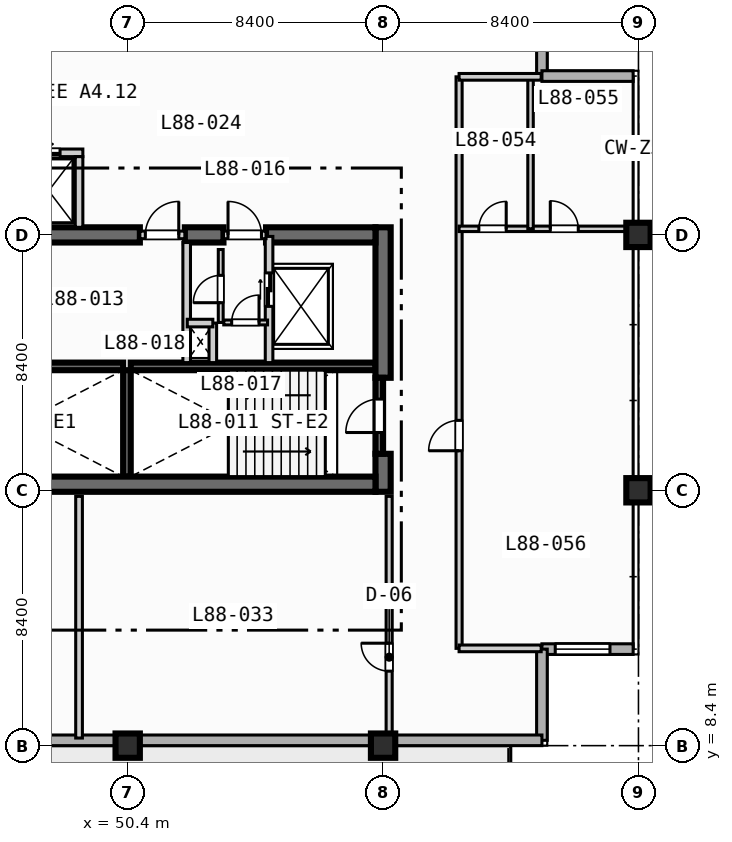
"""IFC4 building model, lengths in metres.
Left out: names, types, materials, properties, quantities, classifications, styles, units other than length and angle.
Written with IfcOpenShell. Run it as: python <this file> out.ifc"""

import sys

from ifc_helpers import new_model, si_unit, direction, frame, frame_2d, origin, origin_2d, place, context, subcontext, project, spatial, rectangle, extrude, element, fill, save


model = new_model("IFC4")
c1 = context("Model", 3, precision=1e-05, world=origin(), true_north=direction((0.0, 1.0)))
c2 = subcontext(c1, "Body", "Model", "MODEL_VIEW")
j1 = project(units=[si_unit("LENGTHUNIT", "METRE"), si_unit("PLANEANGLEUNIT", "RADIAN")], contexts=[c1])
p1 = place(None, origin())
s1 = spatial("IfcSite", under=j1, at=p1, CompositionType="ELEMENT")
p2 = place(p1, origin())
s2 = spatial("IfcBuilding", under=s1, at=p2, CompositionType="ELEMENT")
p3 = place(p2, frame((0.0, 0.0, 355.4)))
s3 = spatial("IfcBuildingStorey", under=s2, at=p3, CompositionType="ELEMENT", Elevation=355.4)
for number, where, z_axis, x_axis in (
    (1, (42.2, 20.875, 0.0), (0.0, 0.0, 1.0), (1.0, 0.0, 0.0)),
    (2, (50.5, 20.875, 0.0), (0.0, 0.0, 1.0), (1.0, 0.0, 0.0)),
):
    element("IfcWall", number, at=place(p3, frame(where, z_axis=z_axis, x_axis=x_axis)), inside=s3, PredefinedType="SOLIDWALL", context=c2, shape_type="SweptSolid", body=[
        extrude(rectangle(XDim=8.05, YDim=0.25, at=frame_2d((4.025, 0.0))), origin(), (0.0, 0.0, 1.0), 3.97),
    ])
p4 = place(p3, frame((50.375, 17.25, 0.0), z_axis=(0.0, 0.0, 1.0), x_axis=(0.0, 1.0, 0.0)))
e3 = element("IfcWall", 3, at=p4, inside=s3, PredefinedType="SOLIDWALL", context=c2, shape_type="SweptSolid", body=[
    extrude(rectangle(XDim=3.5, YDim=0.25, at=frame_2d((1.75, 0.0))), origin(), (0.0, 0.0, 1.0), 3.97),
])
p5 = place(p3, frame((58.8, 16.75, 0.0), z_axis=(0.0, 0.0, 1.0), x_axis=(0.0, 1.0, 0.0)))
e4 = element("IfcWall", 4, at=p5, inside=s3, PredefinedType="SHEAR", context=c2, shape_type="SweptSolid", body=[
    extrude(rectangle(XDim=1.25, YDim=0.5, at=frame_2d((0.625, 0.0))), origin(), (0.0, 0.0, 1.0), 3.97),
])
p6 = place(p3, frame((58.8, 20.5, 0.0), z_axis=(0.0, 0.0, 1.0), x_axis=(0.0, 1.0, 0.0)))
e5 = element("IfcWall", 5, at=p6, inside=s3, PredefinedType="SHEAR", context=c2, shape_type="SweptSolid", body=[
    extrude(rectangle(XDim=4.95, YDim=0.5, at=frame_2d((2.475, 0.0))), origin(), (0.0, 0.0, 1.0), 3.97),
])
p7 = place(p3, frame((42.2, 17.0, 0.0), z_axis=(0.0, 0.0, 1.0), x_axis=(1.0, 0.0, 0.0)))
e6 = element("IfcWall", 6, at=p7, inside=s3, PredefinedType="SHEAR", context=c2, shape_type="SweptSolid", body=[
    extrude(rectangle(XDim=16.35, YDim=0.5, at=frame_2d((8.175, 0.0))), origin(), (0.0, 0.0, 1.0), 3.97),
])
p8 = place(p3, frame((42.2, 25.2, 0.0), z_axis=(0.0, 0.0, 1.0), x_axis=(1.0, 0.0, 0.0)))
e7 = element("IfcWall", 7, at=p8, inside=s3, PredefinedType="SHEAR", context=c2, shape_type="SweptSolid", body=[
    extrude(rectangle(XDim=8.6, YDim=0.5, at=frame_2d((4.3, 0.0))), origin(), (0.0, 0.0, 1.0), 3.97),
])
p9 = place(p3, frame((52.28, 25.2, 0.0), z_axis=(0.0, 0.0, 1.0), x_axis=(1.0, 0.0, 0.0)))
e8 = element("IfcWall", 8, at=p9, inside=s3, PredefinedType="SHEAR", context=c2, shape_type="SweptSolid", body=[
    extrude(rectangle(XDim=1.27, YDim=0.5, at=frame_2d((0.635, 0.0))), origin(), (0.0, 0.0, 1.0), 3.97),
])
p10 = place(p3, frame((54.95, 25.2, 0.0), z_axis=(0.0, 0.0, 1.0), x_axis=(1.0, 0.0, 0.0)))
e9 = element("IfcWall", 9, at=p10, inside=s3, PredefinedType="SHEAR", context=c2, shape_type="SweptSolid", body=[
    extrude(rectangle(XDim=3.6, YDim=0.5, at=frame_2d((1.8, 0.0))), origin(), (0.0, 0.0, 1.0), 3.97),
])
for number, where, z_axis, x_axis in (
    (10, (50.4, 8.4, 0.0), (0.0, 0.0, 1.0), (1.0, 0.0, 0.0)),
    (11, (58.8, 8.4, 0.0), (0.0, 0.0, 1.0), (1.0, 0.0, 0.0)),
    (12, (67.2, 16.8, 0.0), (0.0, 0.0, 1.0), (1.0, 0.0, 0.0)),
    (13, (67.2, 25.2, 0.0), (0.0, 0.0, 1.0), (1.0, 0.0, 0.0)),
):
    element("IfcColumn", number, at=place(p3, frame(where, z_axis=z_axis, x_axis=x_axis)), inside=s3, PredefinedType="COLUMN", context=c2, shape_type="SweptSolid", body=[
        extrude(rectangle(XDim=0.8, YDim=0.8, at=origin_2d()), origin(), (0.0, 0.0, 1.0), 4.2),
    ])
for number, where, z_axis, x_axis in (
    (14, (64.025, 33.425, 0.0), (0.0, 0.0, 1.0), (0.0, -1.0, 0.0)),
    (15, (64.025, 30.425, 0.0), (0.0, 0.0, 1.0), (1.0, 0.0, 0.0)),
):
    element("IfcWall", number, at=place(p3, frame(where, z_axis=z_axis, x_axis=x_axis)), inside=s3, PredefinedType="STANDARD", context=c2, shape_type="SweptSolid", body=[
        extrude(rectangle(XDim=3.0, YDim=0.35, at=frame_2d((1.5, 0.0))), origin(), (0.0, 0.0, 1.0), 3.97),
    ])
p11 = place(p3, frame((67.025, 11.575, 0.0), z_axis=(0.0, 0.0, 1.0), x_axis=(-1.0, 0.0, 0.0)))
e16 = element("IfcWall", 16, at=p11, inside=s3, PredefinedType="STANDARD", context=c2, shape_type="SweptSolid", body=[
    extrude(rectangle(XDim=3.0, YDim=0.35, at=frame_2d((1.5, 0.0))), origin(), (0.0, 0.0, 1.0), 3.97),
])
p12 = place(p11, frame((0.762, 0.0, 0.85)))
e17 = element("IfcOpeningElement", 17, at=p12, cuts=e16, PredefinedType="OPENING", context=c2, shape_type="SweptSolid", body=[
    extrude(rectangle(XDim=1.8, YDim=1.8, at=frame_2d((0.9, 0.9))), frame((0.0, 0.185, 0.0), z_axis=(0.0, -1.0, 0.0), x_axis=(1.0, 0.0, 0.0)), (0.0, 0.0, 1.0), 0.37),
])
p13 = place(p3, frame((64.025, 11.575, 0.0), z_axis=(0.0, 0.0, 1.0), x_axis=(0.0, -1.0, 0.0)))
e18 = element("IfcWall", 18, at=p13, inside=s3, PredefinedType="STANDARD", context=c2, shape_type="SweptSolid", body=[
    extrude(rectangle(XDim=3.0, YDim=0.35, at=frame_2d((1.5, 0.0))), origin(), (0.0, 0.0, 1.0), 3.97),
])
p14 = place(p3, frame((64.025, 8.575, 0.0), z_axis=(0.0, 0.0, 1.0), x_axis=(-1.0, 0.0, 0.0)))
e19 = element("IfcWall", 19, at=p14, inside=s3, PredefinedType="STANDARD", context=c2, shape_type="SweptSolid", body=[
    extrude(rectangle(XDim=52.45, YDim=0.35, at=frame_2d((26.225, 0.0))), origin(), (0.0, 0.0, 1.0), 3.97),
])
p15 = place(p14, frame((34.925, 0.0, 0.0)))
e20 = element("IfcOpeningElement", 20, at=p15, cuts=e19, PredefinedType="OPENING", context=c2, shape_type="SweptSolid", body=[
    extrude(rectangle(XDim=1.4, YDim=2.2, at=frame_2d((0.7, 1.1))), frame((0.0, 0.185, 0.0), z_axis=(0.0, -1.0, 0.0), x_axis=(1.0, 0.0, 0.0)), (0.0, 0.0, 1.0), 0.37),
])
p16 = place(p14, frame((24.825, 0.0, 0.85)))
e21 = element("IfcOpeningElement", 21, at=p16, cuts=e19, PredefinedType="OPENING", context=c2, shape_type="SweptSolid", body=[
    extrude(rectangle(XDim=2.8, YDim=2.1, at=frame_2d((1.4, 1.05))), frame((0.0, 0.185, 0.0), z_axis=(0.0, -1.0, 0.0), x_axis=(1.0, 0.0, 0.0)), (0.0, 0.0, 1.0), 0.37),
])
p17 = place(p14, frame((16.425, 0.0, 0.85)))
e22 = element("IfcOpeningElement", 22, at=p17, cuts=e19, PredefinedType="OPENING", context=c2, shape_type="SweptSolid", body=[
    extrude(rectangle(XDim=2.8, YDim=2.1, at=frame_2d((1.4, 1.05))), frame((0.0, 0.185, 0.0), z_axis=(0.0, -1.0, 0.0), x_axis=(1.0, 0.0, 0.0)), (0.0, 0.0, 1.0), 0.37),
])
p18 = place(p14, frame((50.275, 0.0, 0.85)))
e23 = element("IfcOpeningElement", 23, at=p18, cuts=e19, PredefinedType="OPENING", context=c2, shape_type="SweptSolid", body=[
    extrude(rectangle(XDim=1.8, YDim=1.8, at=frame_2d((0.9, 0.9))), frame((0.0, 0.185, 0.0), z_axis=(0.0, -1.0, 0.0), x_axis=(1.0, 0.0, 0.0)), (0.0, 0.0, 1.0), 0.37),
])
p19 = place(p14, frame((44.875, 0.0, 0.85)))
e24 = element("IfcOpeningElement", 24, at=p19, cuts=e19, PredefinedType="OPENING", context=c2, shape_type="SweptSolid", body=[
    extrude(rectangle(XDim=1.8, YDim=1.8, at=frame_2d((0.9, 0.9))), frame((0.0, 0.185, 0.0), z_axis=(0.0, -1.0, 0.0), x_axis=(1.0, 0.0, 0.0)), (0.0, 0.0, 1.0), 0.37),
])
p20 = place(p14, frame((41.475, 0.0, 0.85)))
e25 = element("IfcOpeningElement", 25, at=p20, cuts=e19, PredefinedType="OPENING", context=c2, shape_type="SweptSolid", body=[
    extrude(rectangle(XDim=1.8, YDim=1.8, at=frame_2d((0.9, 0.9))), frame((0.0, 0.185, 0.0), z_axis=(0.0, -1.0, 0.0), x_axis=(1.0, 0.0, 0.0)), (0.0, 0.0, 1.0), 0.37),
])
p21 = place(p14, frame((32.475, 0.0, 0.85)))
e26 = element("IfcOpeningElement", 26, at=p21, cuts=e19, PredefinedType="OPENING", context=c2, shape_type="SweptSolid", body=[
    extrude(rectangle(XDim=1.8, YDim=1.8, at=frame_2d((0.9, 0.9))), frame((0.0, 0.185, 0.0), z_axis=(0.0, -1.0, 0.0), x_axis=(1.0, 0.0, 0.0)), (0.0, 0.0, 1.0), 0.37),
])
p22 = place(p3, frame((58.675, 18.0, 0.0), z_axis=(0.0, 0.0, 1.0), x_axis=(0.0, 1.0, 0.0)))
e27 = element("IfcWall", 27, at=p22, inside=s3, PredefinedType="SOLIDWALL", context=c2, shape_type="SweptSolid", body=[
    extrude(rectangle(XDim=2.5, YDim=0.25, at=frame_2d((1.25, 0.0))), origin(), (0.0, 0.0, 1.0), 3.97),
])
p23 = place(p22, frame((0.7, 0.0, 0.0)))
e28 = element("IfcOpeningElement", 28, at=p23, cuts=e27, PredefinedType="OPENING", context=c2, shape_type="SweptSolid", body=[
    extrude(rectangle(XDim=1.1, YDim=2.15, at=frame_2d((0.55, 1.075))), frame((0.0, 0.135, 0.0), z_axis=(0.0, -1.0, 0.0), x_axis=(1.0, 0.0, 0.0)), (0.0, 0.0, 1.0), 0.27),
])
p24 = place(p3, frame((50.8, 25.2, 0.0), z_axis=(0.0, 0.0, 1.0), x_axis=(1.0, 0.0, 0.0)))
e29 = element("IfcWall", 29, at=p24, inside=s3, PredefinedType="SOLIDWALL", context=c2, shape_type="SweptSolid", body=[
    extrude(rectangle(XDim=1.48, YDim=0.25, at=frame_2d((0.74, 0.0))), origin(), (0.0, 0.0, 1.0), 3.97),
])
p25 = place(p24, frame((0.18, 0.0, 0.0)))
e30 = element("IfcOpeningElement", 30, at=p25, cuts=e29, PredefinedType="OPENING", context=c2, shape_type="SweptSolid", body=[
    extrude(rectangle(XDim=1.1, YDim=2.15, at=frame_2d((0.55, 1.075))), frame((0.0, 0.135, 0.0), z_axis=(0.0, -1.0, 0.0), x_axis=(1.0, 0.0, 0.0)), (0.0, 0.0, 1.0), 0.27),
])
p26 = place(p3, frame((52.34, 21.0, 0.0), z_axis=(0.0, 0.0, 1.0), x_axis=(0.0, 1.0, 0.0)))
e31 = element("IfcWall", 31, at=p26, inside=s3, PredefinedType="SOLIDWALL", context=c2, shape_type="SweptSolid", body=[
    extrude(rectangle(XDim=3.95, YDim=0.25, at=frame_2d((1.975, 0.0))), origin(), (0.0, 0.0, 1.0), 3.97),
])
p27 = place(p3, frame((55.05, 21.0, 0.0), z_axis=(0.0, 0.0, 1.0), x_axis=(0.0, 1.0, 0.0)))
e32 = element("IfcWall", 32, at=p27, inside=s3, PredefinedType="SOLIDWALL", context=c2, shape_type="SweptSolid", body=[
    extrude(rectangle(XDim=4.15, YDim=0.25, at=frame_2d((2.075, 0.0))), origin(), (0.0, 0.0, 1.0), 3.97),
])
p28 = place(p27, frame((1.85, 0.0, 0.0)))
e33 = element("IfcOpeningElement", 33, at=p28, cuts=e32, PredefinedType="OPENING", context=c2, shape_type="SweptSolid", body=[
    extrude(rectangle(XDim=1.1, YDim=2.15, at=frame_2d((0.55, 1.075))), frame((0.0, 0.135, 0.0), z_axis=(0.0, -1.0, 0.0), x_axis=(1.0, 0.0, 0.0)), (0.0, 0.0, 1.0), 0.27),
])
p29 = place(p3, frame((53.55, 25.2, 0.0), z_axis=(0.0, 0.0, 1.0), x_axis=(1.0, 0.0, 0.0)))
e34 = element("IfcWall", 34, at=p29, inside=s3, PredefinedType="SOLIDWALL", context=c2, shape_type="SweptSolid", body=[
    extrude(rectangle(XDim=1.4, YDim=0.25, at=frame_2d((0.7, 0.0))), origin(), (0.0, 0.0, 1.0), 3.97),
])
p30 = place(p29, frame((0.15, 0.0, 0.0)))
e35 = element("IfcOpeningElement", 35, at=p30, cuts=e34, PredefinedType="OPENING", context=c2, shape_type="SweptSolid", body=[
    extrude(rectangle(XDim=1.1, YDim=2.15, at=frame_2d((0.55, 1.075))), frame((0.0, 0.135, 0.0), z_axis=(0.0, -1.0, 0.0), x_axis=(1.0, 0.0, 0.0)), (0.0, 0.0, 1.0), 0.27),
])
p31 = place(p3, frame((53.2, 21.0, 0.0), z_axis=(0.0, 0.0, 1.0), x_axis=(0.0, 1.0, 0.0)))
e36 = element("IfcWall", 36, at=p31, inside=s3, PredefinedType="SOLIDWALL", context=c2, shape_type="SweptSolid", body=[
    extrude(rectangle(XDim=1.3, YDim=0.25, at=frame_2d((0.65, 0.0))), origin(), (0.0, 0.0, 1.0), 3.97),
])
p32 = place(p3, frame((52.36, 22.3, 0.0), z_axis=(0.0, 0.0, 1.0), x_axis=(1.0, 0.0, 0.0)))
e37 = element("IfcWall", 37, at=p32, inside=s3, PredefinedType="SOLIDWALL", context=c2, shape_type="SweptSolid", body=[
    extrude(rectangle(XDim=0.84, YDim=0.25, at=frame_2d((0.42, 0.0))), origin(), (0.0, 0.0, 1.0), 3.97),
])
p33 = place(p3, frame((53.56, 22.32, 0.0), z_axis=(0.0, 0.0, 1.0), x_axis=(1.0, 0.0, 0.0)))
e38 = element("IfcWall", 38, at=p33, inside=s3, PredefinedType="PARTITIONING", context=c2, shape_type="SweptSolid", body=[
    extrude(rectangle(XDim=1.44, YDim=0.16, at=frame_2d((0.72, 0.0))), origin(), (0.0, 0.0, 1.0), 3.97),
])
p34 = place(p33, frame((0.26, 0.0, 0.0)))
e39 = element("IfcOpeningElement", 39, at=p34, cuts=e38, PredefinedType="OPENING", context=c2, shape_type="SweptSolid", body=[
    extrude(rectangle(XDim=0.9, YDim=2.1, at=frame_2d((0.45, 1.05))), frame((0.0, 0.09, 0.0), z_axis=(0.0, -1.0, 0.0), x_axis=(1.0, 0.0, 0.0)), (0.0, 0.0, 1.0), 0.18),
])
p35 = place(p3, frame((53.46, 22.32, 0.0), z_axis=(0.0, 0.0, 1.0), x_axis=(0.0, 1.0, 0.0)))
e40 = element("IfcWall", 40, at=p35, inside=s3, PredefinedType="PARTITIONING", context=c2, shape_type="SweptSolid", body=[
    extrude(rectangle(XDim=2.4, YDim=0.16, at=frame_2d((1.2, 0.0))), origin(), (0.0, 0.0, 1.0), 3.97),
])
p36 = place(p35, frame((0.65, 0.0, 0.0)))
e41 = element("IfcOpeningElement", 41, at=p36, cuts=e40, PredefinedType="OPENING", context=c2, shape_type="SweptSolid", body=[
    extrude(rectangle(XDim=0.9, YDim=2.1, at=frame_2d((0.45, 1.05))), frame((0.0, 0.09, 0.0), z_axis=(0.0, -1.0, 0.0), x_axis=(1.0, 0.0, 0.0)), (0.0, 0.0, 1.0), 0.18),
])
p37 = place(p3, frame((46.675, 27.9, 0.0), z_axis=(0.0, 0.0, 1.0), x_axis=(1.0, 0.0, 0.0)))
e42 = element("IfcWall", 42, at=p37, inside=s3, PredefinedType="SOLIDWALL", context=c2, shape_type="SweptSolid", body=[
    extrude(rectangle(XDim=2.25, YDim=0.25, at=frame_2d((1.125, 0.0))), origin(), (0.0, 0.0, 1.0), 3.97),
])
p38 = place(p37, frame((0.4, 0.0, 0.0)))
e43 = element("IfcOpeningElement", 43, at=p38, cuts=e42, PredefinedType="OPENING", context=c2, shape_type="SweptSolid", body=[
    extrude(rectangle(XDim=1.1, YDim=2.15, at=frame_2d((0.55, 1.075))), frame((0.0, 0.135, 0.0), z_axis=(0.0, -1.0, 0.0), x_axis=(1.0, 0.0, 0.0)), (0.0, 0.0, 1.0), 0.27),
])
p39 = place(p3, frame((48.8, 25.45, 0.0), z_axis=(0.0, 0.0, 1.0), x_axis=(0.0, 1.0, 0.0)))
e44 = element("IfcWall", 44, at=p39, inside=s3, PredefinedType="SOLIDWALL", context=c2, shape_type="SweptSolid", body=[
    extrude(rectangle(XDim=2.325, YDim=0.25, at=frame_2d((1.163, 0.0))), origin(), (0.0, 0.0, 1.0), 3.97),
])
p40 = place(p3, frame((59.0, 8.65, 0.0), z_axis=(0.0, 0.0, 1.0), x_axis=(0.0, 1.0, 0.0)))
e45 = element("IfcWall", 45, at=p40, inside=s3, PredefinedType="PARTITIONING", context=c2, shape_type="SweptSolid", body=[
    extrude(rectangle(XDim=7.95, YDim=0.2, at=frame_2d((3.975, 0.0))), origin(), (0.0, 0.0, 1.0), 3.431),
])
p41 = place(p40, frame((2.2, 0.0, 0.0)))
e46 = element("IfcOpeningElement", 46, at=p41, cuts=e45, PredefinedType="OPENING", context=c2, shape_type="SweptSolid", body=[
    extrude(rectangle(XDim=0.92, YDim=2.1, at=frame_2d((0.46, 1.05))), frame((0.0, 0.11, 0.0), z_axis=(0.0, -1.0, 0.0), x_axis=(1.0, 0.0, 0.0)), (0.0, 0.0, 1.0), 0.22),
])
p42 = place(p3, frame((48.8, 8.65, 0.0), z_axis=(0.0, 0.0, 1.0), x_axis=(0.0, 1.0, 0.0)))
e47 = element("IfcWall", 47, at=p42, inside=s3, PredefinedType="PARTITIONING", context=c2, shape_type="SweptSolid", body=[
    extrude(rectangle(XDim=7.95, YDim=0.22, at=frame_2d((3.975, 0.0))), origin(), (0.0, 0.0, 1.0), 3.97),
])
p43 = place(p3, frame((61.3, 11.6, 0.0), z_axis=(0.0, 0.0, 1.0), x_axis=(0.0, 1.0, 0.0)))
e48 = element("IfcWall", 48, at=p43, inside=s3, PredefinedType="PARTITIONING", context=c2, shape_type="SweptSolid", body=[
    extrude(rectangle(XDim=18.8, YDim=0.2, at=frame_2d((9.4, 0.0))), origin(), (0.0, 0.0, 1.0), 3.97),
])
p44 = place(p43, frame((6.5, 0.0, 0.0)))
e49 = element("IfcOpeningElement", 49, at=p44, cuts=e48, PredefinedType="OPENING", context=c2, shape_type="SweptSolid", body=[
    extrude(rectangle(XDim=1.0, YDim=2.15, at=frame_2d((0.5, 1.075))), frame((0.0, 0.11, 0.0), z_axis=(0.0, -1.0, 0.0), x_axis=(1.0, 0.0, 0.0)), (0.0, 0.0, 1.0), 0.22),
])
p45 = place(p3, frame((61.3, 25.4, 0.0), z_axis=(0.0, 0.0, 1.0), x_axis=(1.0, 0.0, 0.0)))
e50 = element("IfcWall", 50, at=p45, inside=s3, PredefinedType="PLUMBINGWALL", context=c2, shape_type="SweptSolid", body=[
    extrude(rectangle(XDim=5.5, YDim=0.18, at=frame_2d((2.75, 0.0))), origin(), (0.0, 0.0, 1.0), 3.37),
])
p46 = place(p45, frame((0.65, 0.0, 0.0)))
e51 = element("IfcOpeningElement", 51, at=p46, cuts=e50, PredefinedType="OPENING", context=c2, shape_type="SweptSolid", body=[
    extrude(rectangle(XDim=0.9, YDim=2.1, at=frame_2d((0.45, 1.05))), frame((0.0, 0.1, 0.0), z_axis=(0.0, -1.0, 0.0), x_axis=(1.0, 0.0, 0.0)), (0.0, 0.0, 1.0), 0.2),
])
p47 = place(p45, frame((3.0, 0.0, 0.0)))
e52 = element("IfcOpeningElement", 52, at=p47, cuts=e50, PredefinedType="OPENING", context=c2, shape_type="SweptSolid", body=[
    extrude(rectangle(XDim=0.92, YDim=2.1, at=frame_2d((0.46, 1.05))), frame((0.0, 0.1, 0.0), z_axis=(0.0, -1.0, 0.0), x_axis=(1.0, 0.0, 0.0)), (0.0, 0.0, 1.0), 0.2),
])
p48 = place(p3, frame((63.65, 25.4, 0.0), z_axis=(0.0, 0.0, 1.0), x_axis=(0.0, 1.0, 0.0)))
e53 = element("IfcWall", 53, at=p48, inside=s3, PredefinedType="PLUMBINGWALL", context=c2, shape_type="SweptSolid", body=[
    extrude(rectangle(XDim=5.0, YDim=0.18, at=frame_2d((2.5, 0.0))), origin(), (0.0, 0.0, 1.0), 3.97),
])
for number, where, z_axis, x_axis in (
    (54, (61.3, 11.6, 0.0), (0.0, 0.0, 1.0), (1.0, 0.0, 0.0)),
    (55, (61.3, 30.4, 0.0), (0.0, 0.0, 1.0), (1.0, 0.0, 0.0)),
):
    element("IfcWall", number, at=place(p3, frame(where, z_axis=z_axis, x_axis=x_axis)), inside=s3, PredefinedType="PARTITIONING", context=c2, shape_type="SweptSolid", body=[
        extrude(rectangle(XDim=2.7, YDim=0.22, at=frame_2d((1.35, 0.0))), origin(), (0.0, 0.0, 1.0), 3.97),
    ])
p49 = place(p12, origin())
e56 = element("IfcWindow", 56, at=p49, inside=s3, PartitioningType="SINGLE_PANEL", PredefinedType="WINDOW", context=c2, shape_type="SweptSolid", body=[
    extrude(rectangle(XDim=1.8, YDim=1.8, at=frame_2d((0.9, 0.9))), frame((0.0, 0.03, 0.0), z_axis=(0.0, -1.0, 0.0), x_axis=(1.0, 0.0, 0.0)), (0.0, 0.0, 1.0), 0.06),
])
fill(e17, e56)
p50 = place(p23, origin())
e57 = element("IfcDoor", 57, at=p50, inside=s3, OperationType="SINGLE_SWING_LEFT", PredefinedType="DOOR", context=c2, shape_type="SweptSolid", body=[
    extrude(rectangle(XDim=1.1, YDim=2.15, at=frame_2d((0.55, 1.075))), frame((0.0, 0.025, 0.0), z_axis=(0.0, -1.0, 0.0), x_axis=(1.0, 0.0, 0.0)), (0.0, 0.0, 1.0), 0.05),
])
fill(e28, e57)
p51 = place(p25, origin())
e58 = element("IfcDoor", 58, at=p51, inside=s3, OperationType="SINGLE_SWING_RIGHT", PredefinedType="DOOR", context=c2, shape_type="SweptSolid", body=[
    extrude(rectangle(XDim=1.1, YDim=2.15, at=frame_2d((0.55, 1.075))), frame((0.0, 0.025, 0.0), z_axis=(0.0, -1.0, 0.0), x_axis=(1.0, 0.0, 0.0)), (0.0, 0.0, 1.0), 0.05),
])
fill(e30, e58)
p52 = place(p28, origin())
e59 = element("IfcDoor", 59, at=p52, inside=s3, OperationType="SLIDING_TO_LEFT", PredefinedType="DOOR", context=c2, shape_type="SweptSolid", body=[
    extrude(rectangle(XDim=1.1, YDim=2.15, at=frame_2d((0.55, 1.075))), frame((0.0, 0.025, 0.0), z_axis=(0.0, -1.0, 0.0), x_axis=(1.0, 0.0, 0.0)), (0.0, 0.0, 1.0), 0.05),
])
fill(e33, e59)
p53 = place(p30, origin())
e60 = element("IfcDoor", 60, at=p53, inside=s3, OperationType="SINGLE_SWING_LEFT", PredefinedType="DOOR", context=c2, shape_type="SweptSolid", body=[
    extrude(rectangle(XDim=1.1, YDim=2.15, at=frame_2d((0.55, 1.075))), frame((0.0, 0.025, 0.0), z_axis=(0.0, -1.0, 0.0), x_axis=(1.0, 0.0, 0.0)), (0.0, 0.0, 1.0), 0.05),
])
fill(e35, e60)
p54 = place(p34, origin())
e61 = element("IfcDoor", 61, at=p54, inside=s3, OperationType="SINGLE_SWING_RIGHT", PredefinedType="DOOR", context=c2, shape_type="SweptSolid", body=[
    extrude(rectangle(XDim=0.9, YDim=2.1, at=frame_2d((0.45, 1.05))), frame((0.0, 0.025, 0.0), z_axis=(0.0, -1.0, 0.0), x_axis=(1.0, 0.0, 0.0)), (0.0, 0.0, 1.0), 0.05),
])
fill(e39, e61)
p55 = place(p36, origin())
e62 = element("IfcDoor", 62, at=p55, inside=s3, OperationType="SINGLE_SWING_LEFT", PredefinedType="DOOR", context=c2, shape_type="SweptSolid", body=[
    extrude(rectangle(XDim=0.9, YDim=2.1, at=frame_2d((0.45, 1.05))), frame((0.0, 0.025, 0.0), z_axis=(0.0, -1.0, 0.0), x_axis=(1.0, 0.0, 0.0)), (0.0, 0.0, 1.0), 0.05),
])
fill(e41, e62)
p56 = place(p38, origin())
e63 = element("IfcDoor", 63, at=p56, inside=s3, OperationType="SLIDING_TO_LEFT", PredefinedType="DOOR", context=c2, shape_type="SweptSolid", body=[
    extrude(rectangle(XDim=1.1, YDim=2.15, at=frame_2d((0.55, 1.075))), frame((0.0, 0.025, 0.0), z_axis=(0.0, -1.0, 0.0), x_axis=(1.0, 0.0, 0.0)), (0.0, 0.0, 1.0), 0.05),
])
fill(e43, e63)
p57 = place(p41, origin())
e64 = element("IfcDoor", 64, at=p57, inside=s3, OperationType="SINGLE_SWING_RIGHT", PredefinedType="DOOR", context=c2, shape_type="SweptSolid", body=[
    extrude(rectangle(XDim=0.92, YDim=2.1, at=frame_2d((0.46, 1.05))), frame((0.0, 0.025, 0.0), z_axis=(0.0, -1.0, 0.0), x_axis=(1.0, 0.0, 0.0)), (0.0, 0.0, 1.0), 0.05),
])
fill(e46, e64)
p58 = place(p44, origin())
e65 = element("IfcDoor", 65, at=p58, inside=s3, OperationType="SINGLE_SWING_LEFT", PredefinedType="DOOR", context=c2, shape_type="SweptSolid", body=[
    extrude(rectangle(XDim=1.0, YDim=2.15, at=frame_2d((0.5, 1.075))), frame((0.0, 0.025, 0.0), z_axis=(0.0, -1.0, 0.0), x_axis=(1.0, 0.0, 0.0)), (0.0, 0.0, 1.0), 0.05),
])
fill(e49, e65)
p59 = place(p46, origin())
e66 = element("IfcDoor", 66, at=p59, inside=s3, OperationType="SINGLE_SWING_RIGHT", PredefinedType="DOOR", context=c2, shape_type="SweptSolid", body=[
    extrude(rectangle(XDim=0.9, YDim=2.1, at=frame_2d((0.45, 1.05))), frame((0.0, 0.025, 0.0), z_axis=(0.0, -1.0, 0.0), x_axis=(1.0, 0.0, 0.0)), (0.0, 0.0, 1.0), 0.05),
])
fill(e51, e66)
p60 = place(p47, origin())
e67 = element("IfcDoor", 67, at=p60, inside=s3, OperationType="SINGLE_SWING_LEFT", PredefinedType="DOOR", context=c2, shape_type="SweptSolid", body=[
    extrude(rectangle(XDim=0.92, YDim=2.1, at=frame_2d((0.46, 1.05))), frame((0.0, 0.025, 0.0), z_axis=(0.0, -1.0, 0.0), x_axis=(1.0, 0.0, 0.0)), (0.0, 0.0, 1.0), 0.05),
])
fill(e52, e67)
save(model, sys.argv[1])
